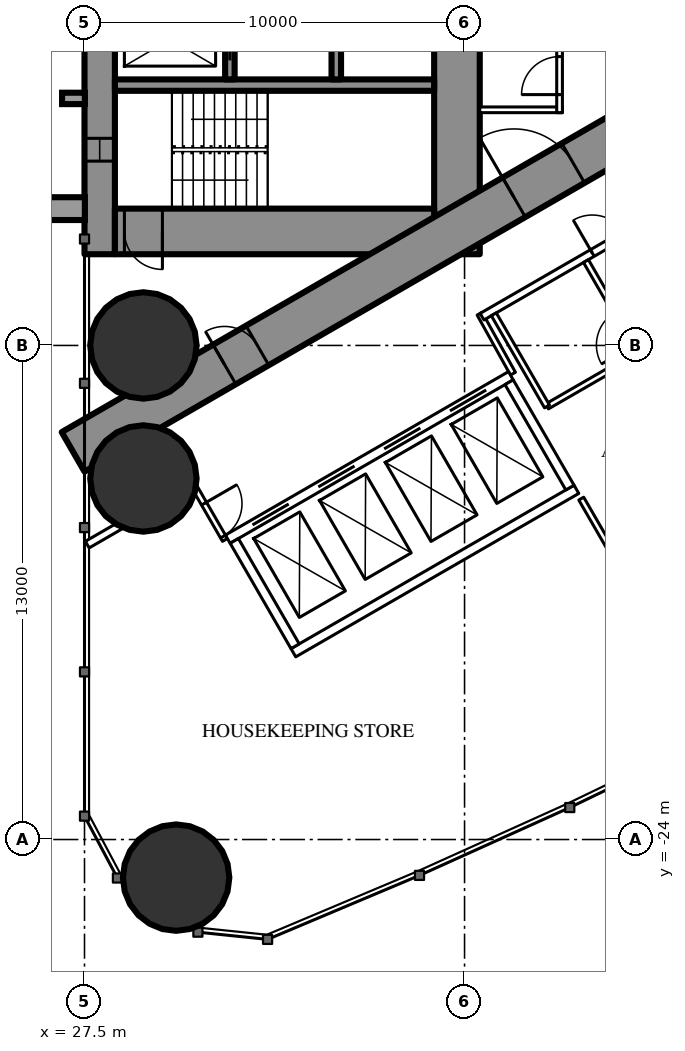
"""IFC4 building model, lengths in metres.
Left out: names, types, materials, properties, quantities, classifications, styles, units other than length and angle.
Written with IfcOpenShell. Run it as: python <this file> out.ifc"""

import sys

from ifc_helpers import new_model, si_unit, direction, frame, frame_2d, origin, origin_2d, place, context, subcontext, project, spatial, rectangle, hollow_circle, extrude, element, fill, save


model = new_model("IFC4")
c1 = context("Model", 3, precision=1e-05, world=origin(), true_north=direction((0.0, 1.0)))
c2 = subcontext(c1, "Body", "Model", "MODEL_VIEW")
j1 = project(units=[si_unit("LENGTHUNIT", "METRE"), si_unit("PLANEANGLEUNIT", "RADIAN")], contexts=[c1])
p1 = place(None, origin())
s1 = spatial("IfcSite", under=j1, at=p1, CompositionType="ELEMENT")
p2 = place(p1, origin())
s2 = spatial("IfcBuilding", under=s1, at=p2, CompositionType="ELEMENT")
p3 = place(p2, frame((0.0, 0.0, 18.0)))
s3 = spatial("IfcBuildingStorey", under=s2, at=p3, CompositionType="ELEMENT", Elevation=18.0)
for number, where, z_axis, x_axis in (
    (1, (29.911, -25.002, 0.0), (0.0, 0.0, 1.0), (1.0, 0.0, 0.0)),
    (2, (29.05, -11.0, 0.0), (0.0, 0.0, 1.0), (1.0, 0.0, 0.0)),
    (3, (29.05, -14.5, 0.0), (0.0, 0.0, 1.0), (1.0, 0.0, 0.0)),
):
    element("IfcColumn", number, at=place(p3, frame(where, z_axis=z_axis, x_axis=x_axis)), inside=s3, PredefinedType="COLUMN", context=c2, shape_type="SweptSolid", body=[
        extrude(hollow_circle(Radius=1.4, WallThickness=0.12, at=origin_2d()), origin(), (0.0, 0.0, 1.0), 3.5),
    ])
p4 = place(p3, frame((27.9, -8.6, 0.0), z_axis=(0.0, 0.0, 1.0), x_axis=(0.0, 1.0, 0.0)))
e4 = element("IfcWall", 4, at=p4, inside=s3, PredefinedType="SHEAR", context=c2, shape_type="SweptSolid", body=[
    extrude(rectangle(XDim=17.2, YDim=0.8, at=frame_2d((8.6, 0.0))), origin(), (0.0, 0.0, 1.0), 3.5),
])
p5 = place(p4, frame((2.45, 0.0, 0.6)))
e5 = element("IfcOpeningElement", 5, at=p5, cuts=e4, PredefinedType="OPENING", context=c2, shape_type="SweptSolid", body=[
    extrude(rectangle(XDim=0.6, YDim=2.1, at=frame_2d((0.3, 1.05))), frame((0.0, 0.41, 0.0), z_axis=(0.0, -1.0, 0.0), x_axis=(1.0, 0.0, 0.0)), (0.0, 0.0, 1.0), 0.82),
])
p6 = place(p4, frame((14.15, 0.0, 0.6)))
e6 = element("IfcOpeningElement", 6, at=p6, cuts=e4, PredefinedType="OPENING", context=c2, shape_type="SweptSolid", body=[
    extrude(rectangle(XDim=0.6, YDim=2.1, at=frame_2d((0.3, 1.05))), frame((0.0, 0.41, 0.0), z_axis=(0.0, -1.0, 0.0), x_axis=(1.0, 0.0, 0.0)), (0.0, 0.0, 1.0), 0.82),
])
p7 = place(p3, frame((37.3, -8.6, 0.0), z_axis=(0.0, 0.0, 1.0), x_axis=(0.0, 1.0, 0.0)))
e7 = element("IfcWall", 7, at=p7, inside=s3, PredefinedType="SHEAR", context=c2, shape_type="SweptSolid", body=[
    extrude(rectangle(XDim=17.2, YDim=1.2, at=frame_2d((8.6, 0.0))), origin(), (0.0, 0.0, 1.0), 3.5),
])
p8 = place(p7, frame((7.7, 0.0, 0.0)))
e8 = element("IfcOpeningElement", 8, at=p8, cuts=e7, PredefinedType="OPENING", context=c2, shape_type="SweptSolid", body=[
    extrude(rectangle(XDim=1.8, YDim=2.2, at=frame_2d((0.9, 1.1))), frame((0.0, 0.61, 0.0), z_axis=(0.0, -1.0, 0.0), x_axis=(1.0, 0.0, 0.0)), (0.0, 0.0, 1.0), 1.22),
])
p9 = place(p3, frame((28.3, -8.0, 0.0), z_axis=(0.0, 0.0, 1.0), x_axis=(1.0, 0.0, 0.0)))
e9 = element("IfcWall", 9, at=p9, inside=s3, PredefinedType="SHEAR", context=c2, shape_type="SweptSolid", body=[
    extrude(rectangle(XDim=8.4, YDim=1.2, at=frame_2d((4.2, 0.0))), origin(), (0.0, 0.0, 1.0), 3.5),
])
p10 = place(p9, frame((0.25, 0.0, 0.0)))
e10 = element("IfcOpeningElement", 10, at=p10, cuts=e9, PredefinedType="OPENING", context=c2, shape_type="SweptSolid", body=[
    extrude(rectangle(XDim=1.0, YDim=2.2, at=frame_2d((0.5, 1.1))), frame((0.0, 0.61, 0.0), z_axis=(0.0, -1.0, 0.0), x_axis=(1.0, 0.0, 0.0)), (0.0, 0.0, 1.0), 1.22),
])
p11 = place(p3, frame((28.3, -4.15, 0.0), z_axis=(0.0, 0.0, 1.0), x_axis=(1.0, 0.0, 0.0)))
e11 = element("IfcWall", 11, at=p11, inside=s3, PredefinedType="SHEAR", context=c2, shape_type="SweptSolid", body=[
    extrude(rectangle(XDim=8.4, YDim=0.3, at=frame_2d((4.2, 0.0))), origin(), (0.0, 0.0, 1.0), 3.5),
])
p12 = place(p3, frame((31.325, -4.0, 0.0), z_axis=(0.0, 0.0, 1.0), x_axis=(0.0, 1.0, 0.0)))
e12 = element("IfcWall", 12, at=p12, inside=s3, PredefinedType="SHEAR", context=c2, shape_type="SweptSolid", body=[
    extrude(rectangle(XDim=2.1, YDim=0.25, at=frame_2d((1.05, 0.0))), origin(), (0.0, 0.0, 1.0), 3.5),
])
p13 = place(p12, frame((0.5, 0.0, 0.0)))
e13 = element("IfcOpeningElement", 13, at=p13, cuts=e12, PredefinedType="OPENING", context=c2, shape_type="SweptSolid", body=[
    extrude(rectangle(XDim=1.1, YDim=2.2, at=frame_2d((0.55, 1.1))), frame((0.0, 0.135, 0.0), z_axis=(0.0, -1.0, 0.0), x_axis=(1.0, 0.0, 0.0)), (0.0, 0.0, 1.0), 0.27),
])
p14 = place(p3, frame((34.125, -4.0, 0.0), z_axis=(0.0, 0.0, 1.0), x_axis=(0.0, 1.0, 0.0)))
e14 = element("IfcWall", 14, at=p14, inside=s3, PredefinedType="SHEAR", context=c2, shape_type="SweptSolid", body=[
    extrude(rectangle(XDim=2.35, YDim=0.25, at=frame_2d((1.175, 0.0))), origin(), (0.0, 0.0, 1.0), 3.5),
])
p15 = place(p14, frame((0.875, 0.0, 0.0)))
e15 = element("IfcOpeningElement", 15, at=p15, cuts=e14, PredefinedType="OPENING", context=c2, shape_type="SweptSolid", body=[
    extrude(rectangle(XDim=0.6, YDim=2.0, at=frame_2d((0.3, 1.0))), frame((0.0, 0.135, 0.0), z_axis=(0.0, -1.0, 0.0), x_axis=(1.0, 0.0, 0.0)), (0.0, 0.0, 1.0), 0.27),
])
p16 = place(p3, frame((27.2, -13.8, 0.0), z_axis=(0.0, 0.0, 1.0), x_axis=(0.866027159892, 0.499996958321, 0.0)))
e16 = element("IfcWall", 16, at=p16, inside=s3, PredefinedType="SHEAR", context=c2, shape_type="SweptSolid", body=[
    extrude(rectangle(XDim=27.947, YDim=1.2, at=frame_2d((13.973, 0.0))), origin(), (0.0, 0.0, 1.0), 3.5),
])
p17 = place(p16, frame((4.6, 0.0, 0.0)))
e17 = element("IfcOpeningElement", 17, at=p17, cuts=e16, PredefinedType="OPENING", context=c2, shape_type="SweptSolid", body=[
    extrude(rectangle(XDim=1.0, YDim=2.2, at=frame_2d((0.5, 1.1))), frame((0.0, 0.61, 0.0), z_axis=(0.0, -1.0, 0.0), x_axis=(1.0, 0.0, 0.0)), (0.0, 0.0, 1.0), 1.22),
])
p18 = place(p16, frame((13.395, 0.0, 0.0)))
e18 = element("IfcOpeningElement", 18, at=p18, cuts=e16, PredefinedType="OPENING", context=c2, shape_type="SweptSolid", body=[
    extrude(rectangle(XDim=1.8, YDim=2.2, at=frame_2d((0.9, 1.1))), frame((0.0, 0.61, 0.0), z_axis=(0.0, -1.0, 0.0), x_axis=(1.0, 0.0, 0.0)), (0.0, 0.0, 1.0), 1.22),
])
p19 = place(p3, frame((40.57, -15.03, 0.0), z_axis=(0.0, 0.0, 1.0), x_axis=(0.500012993597, -0.866017901798, 0.0)))
e19 = element("IfcWall", 19, at=p19, inside=s3, PredefinedType="PARTITIONING", context=c2, shape_type="SweptSolid", body=[
    extrude(rectangle(XDim=4.243, YDim=0.15, at=frame_2d((2.122, 0.0))), origin(), (0.0, 0.0, 1.0), 3.25),
])
p20 = place(p3, frame((27.572, -16.241, 0.0), z_axis=(0.0, 0.0, 1.0), x_axis=(0.866029654818, 0.499992636921, 0.0)))
e20 = element("IfcWall", 20, at=p20, inside=s3, PredefinedType="PARTITIONING", context=c2, shape_type="SweptSolid", body=[
    extrude(rectangle(XDim=3.155, YDim=0.2, at=frame_2d((1.577, 0.0))), origin(), (0.0, 0.0, 1.0), 3.25),
])
p21 = place(p3, frame((38.773, -11.742, 0.0), z_axis=(0.0, 0.0, 1.0), x_axis=(-0.485528096672, 0.8742210632, 0.0)))
e21 = element("IfcWall", 21, at=p21, inside=s3, PredefinedType="PARTITIONING", context=c2, shape_type="SweptSolid", body=[
    extrude(rectangle(XDim=1.805, YDim=0.15, at=frame_2d((0.903, 0.0))), origin(), (0.0, 0.0, 1.0), 3.25),
])
p22 = place(p3, frame((30.293, -14.554, 0.0), z_axis=(0.0, 0.0, 1.0), x_axis=(0.499980071345, -0.866036909293, 0.0)))
e22 = element("IfcWall", 22, at=p22, inside=s3, PredefinedType="PARTITIONING", context=c2, shape_type="SweptSolid", body=[
    extrude(rectangle(XDim=1.805, YDim=0.15, at=frame_2d((0.902, 0.0))), origin(), (0.0, 0.0, 1.0), 3.25),
])
p23 = place(p22, frame((0.702, 0.0, 0.0)))
e23 = element("IfcOpeningElement", 23, at=p23, cuts=e22, PredefinedType="OPENING", context=c2, shape_type="SweptSolid", body=[
    extrude(rectangle(XDim=1.0, YDim=2.2, at=frame_2d((0.5, 1.1))), frame((0.0, 0.085, 0.0), z_axis=(0.0, -1.0, 0.0), x_axis=(1.0, 0.0, 0.0)), (0.0, 0.0, 1.0), 0.17),
])
p24 = place(p3, frame((37.96, -10.243, 0.0), z_axis=(0.0, 0.0, 1.0), x_axis=(0.866024617314, 0.500001362204, 0.0)))
e24 = element("IfcWall", 24, at=p24, inside=s3, PredefinedType="PARTITIONING", context=c2, shape_type="SweptSolid", body=[
    extrude(rectangle(XDim=8.512, YDim=0.2, at=frame_2d((4.256, 0.0))), origin(), (0.0, 0.0, 1.0), 3.25),
])
p25 = place(p24, frame((3.35, 0.0, 0.0)))
e25 = element("IfcOpeningElement", 25, at=p25, cuts=e24, PredefinedType="OPENING", context=c2, shape_type="SweptSolid", body=[
    extrude(rectangle(XDim=1.0, YDim=2.2, at=frame_2d((0.5, 1.1))), frame((0.0, 0.11, 0.0), z_axis=(0.0, -1.0, 0.0), x_axis=(1.0, 0.0, 0.0)), (0.0, 0.0, 1.0), 0.22),
])
p26 = place(p3, frame((39.67, -12.605, 0.0), z_axis=(0.0, 0.0, 1.0), x_axis=(0.866018712932, 0.500011588718, 0.0)))
e26 = element("IfcWall", 26, at=p26, inside=s3, PredefinedType="PARTITIONING", context=c2, shape_type="SweptSolid", body=[
    extrude(rectangle(XDim=2.875, YDim=0.15, at=frame_2d((1.438, 0.0))), origin(), (0.0, 0.0, 1.0), 3.25),
])
p27 = place(p3, frame((40.695, -8.78, 0.0), z_axis=(0.0, 0.0, 1.0), x_axis=(0.500049511043, -0.865996816683, 0.0)))
e27 = element("IfcWall", 27, at=p27, inside=s3, PredefinedType="PARTITIONING", context=c2, shape_type="SweptSolid", body=[
    extrude(rectangle(XDim=2.8, YDim=0.15, at=frame_2d((1.4, 0.0))), origin(), (0.0, 0.0, 1.0), 3.25),
])
p28 = place(p27, frame((1.55, 0.0, 0.0)))
e28 = element("IfcOpeningElement", 28, at=p28, cuts=e27, PredefinedType="OPENING", context=c2, shape_type="SweptSolid", body=[
    extrude(rectangle(XDim=1.0, YDim=2.2, at=frame_2d((0.5, 1.1))), frame((0.0, 0.085, 0.0), z_axis=(0.0, -1.0, 0.0), x_axis=(1.0, 0.0, 0.0)), (0.0, 0.0, 1.0), 0.17),
])
p29 = place(p3, frame((38.27, -10.18, 0.0), z_axis=(0.0, 0.0, 1.0), x_axis=(0.500049511043, -0.865996816683, 0.0)))
e29 = element("IfcWall", 29, at=p29, inside=s3, PredefinedType="PARTITIONING", context=c2, shape_type="SweptSolid", body=[
    extrude(rectangle(XDim=2.8, YDim=0.15, at=frame_2d((1.4, 0.0))), origin(), (0.0, 0.0, 1.0), 3.25),
])
p30 = place(p3, frame((37.9, -4.8, 0.0), z_axis=(0.0, 0.0, 1.0), x_axis=(1.0, 0.0, 0.0)))
e30 = element("IfcWall", 30, at=p30, inside=s3, PredefinedType="PARTITIONING", context=c2, shape_type="SweptSolid", body=[
    extrude(rectangle(XDim=2.175, YDim=0.15, at=frame_2d((1.087, 0.0))), origin(), (0.0, 0.0, 1.0), 3.25),
])
p31 = place(p3, frame((40.0, -4.875, 0.0), z_axis=(0.0, 0.0, 1.0), x_axis=(0.0, 1.0, 0.0)))
e31 = element("IfcWall", 31, at=p31, inside=s3, PredefinedType="PARTITIONING", context=c2, shape_type="SweptSolid", body=[
    extrude(rectangle(XDim=1.95, YDim=0.15, at=frame_2d((0.975, 0.0))), origin(), (0.0, 0.0, 1.0), 3.25),
])
p32 = place(p31, frame((0.475, 0.0, 0.0)))
e32 = element("IfcOpeningElement", 32, at=p32, cuts=e31, PredefinedType="OPENING", context=c2, shape_type="SweptSolid", body=[
    extrude(rectangle(XDim=1.0, YDim=2.2, at=frame_2d((0.5, 1.1))), frame((0.0, 0.085, 0.0), z_axis=(0.0, -1.0, 0.0), x_axis=(1.0, 0.0, 0.0)), (0.0, 0.0, 1.0), 0.17),
])
p33 = place(p3, frame((31.271, -16.097, 0.0), z_axis=(0.0, 0.0, 1.0), x_axis=(0.86604045752, 0.499973925258, 0.0)))
e33 = element("IfcWall", 33, at=p33, inside=s3, PredefinedType="PARTITIONING", context=c2, shape_type="SweptSolid", body=[
    extrude(rectangle(XDim=8.6, YDim=0.25, at=frame_2d((4.3, 0.0))), origin(), (0.0, 0.0, 1.0), 3.25),
])
p34 = place(p33, frame((0.75, 0.0, 0.0)))
e34 = element("IfcOpeningElement", 34, at=p34, cuts=e33, PredefinedType="OPENING", context=c2, shape_type="SweptSolid", body=[
    extrude(rectangle(XDim=1.1, YDim=2.2, at=frame_2d((0.55, 1.1))), frame((0.0, 0.135, 0.0), z_axis=(0.0, -1.0, 0.0), x_axis=(1.0, 0.0, 0.0)), (0.0, 0.0, 1.0), 0.27),
])
p35 = place(p33, frame((2.75, 0.0, 0.0)))
e35 = element("IfcOpeningElement", 35, at=p35, cuts=e33, PredefinedType="OPENING", context=c2, shape_type="SweptSolid", body=[
    extrude(rectangle(XDim=1.1, YDim=2.2, at=frame_2d((0.55, 1.1))), frame((0.0, 0.135, 0.0), z_axis=(0.0, -1.0, 0.0), x_axis=(1.0, 0.0, 0.0)), (0.0, 0.0, 1.0), 0.27),
])
p36 = place(p33, frame((4.75, 0.0, 0.0)))
e36 = element("IfcOpeningElement", 36, at=p36, cuts=e33, PredefinedType="OPENING", context=c2, shape_type="SweptSolid", body=[
    extrude(rectangle(XDim=1.1, YDim=2.2, at=frame_2d((0.55, 1.1))), frame((0.0, 0.135, 0.0), z_axis=(0.0, -1.0, 0.0), x_axis=(1.0, 0.0, 0.0)), (0.0, 0.0, 1.0), 0.27),
])
p37 = place(p33, frame((6.75, 0.0, 0.0)))
e37 = element("IfcOpeningElement", 37, at=p37, cuts=e33, PredefinedType="OPENING", context=c2, shape_type="SweptSolid", body=[
    extrude(rectangle(XDim=1.1, YDim=2.2, at=frame_2d((0.55, 1.1))), frame((0.0, 0.135, 0.0), z_axis=(0.0, -1.0, 0.0), x_axis=(1.0, 0.0, 0.0)), (0.0, 0.0, 1.0), 0.27),
])
p38 = place(p3, frame((32.996, -19.086, 0.0), z_axis=(0.0, 0.0, 1.0), x_axis=(0.866028165386, 0.499995216735, 0.0)))
e38 = element("IfcWall", 38, at=p38, inside=s3, PredefinedType="PARTITIONING", context=c2, shape_type="SweptSolid", body=[
    extrude(rectangle(XDim=8.6, YDim=0.25, at=frame_2d((4.3, 0.0))), origin(), (0.0, 0.0, 1.0), 3.25),
])
for number, where, z_axis, x_axis in (
    (39, (31.441, -16.143, 0.0), (0.0, 0.0, 1.0), (0.5, -0.866, 0.0)),
    (40, (38.673, -11.968, 0.0), (0.0, 0.0, 1.0), (0.5, -0.866, 0.0)),
):
    element("IfcWall", number, at=place(p3, frame(where, z_axis=z_axis, x_axis=x_axis)), inside=s3, PredefinedType="PARTITIONING", context=c2, shape_type="SweptSolid", body=[
        extrude(rectangle(XDim=3.201, YDim=0.25, at=frame_2d((1.6, 0.0))), origin(), (0.0, 0.0, 1.0), 3.25),
    ])
p39 = place(p25, origin())
e41 = element("IfcDoor", 41, at=p39, inside=s3, OperationType="SINGLE_SWING_LEFT", PredefinedType="DOOR", context=c2, shape_type="SweptSolid", body=[
    extrude(rectangle(XDim=1.0, YDim=2.2, at=frame_2d((0.5, 1.1))), frame((0.0, 0.025, 0.0), z_axis=(0.0, -1.0, 0.0), x_axis=(1.0, 0.0, 0.0)), (0.0, 0.0, 1.0), 0.05),
])
fill(e25, e41)
p40 = place(p23, origin())
e42 = element("IfcDoor", 42, at=p40, inside=s3, OperationType="SINGLE_SWING_LEFT", PredefinedType="DOOR", context=c2, shape_type="SweptSolid", body=[
    extrude(rectangle(XDim=1.0, YDim=2.2, at=frame_2d((0.5, 1.1))), frame((0.0, 0.025, 0.0), z_axis=(0.0, -1.0, 0.0), x_axis=(1.0, 0.0, 0.0)), (0.0, 0.0, 1.0), 0.05),
])
fill(e23, e42)
p41 = place(p32, origin())
e43 = element("IfcDoor", 43, at=p41, inside=s3, OperationType="SINGLE_SWING_LEFT", PredefinedType="DOOR", context=c2, shape_type="SweptSolid", body=[
    extrude(rectangle(XDim=1.0, YDim=2.2, at=frame_2d((0.5, 1.1))), frame((0.0, 0.025, 0.0), z_axis=(0.0, -1.0, 0.0), x_axis=(1.0, 0.0, 0.0)), (0.0, 0.0, 1.0), 0.05),
])
fill(e32, e43)
p42 = place(p17, origin())
e44 = element("IfcDoor", 44, at=p42, inside=s3, OperationType="SINGLE_SWING_LEFT", PredefinedType="DOOR", context=c2, shape_type="SweptSolid", body=[
    extrude(rectangle(XDim=1.0, YDim=2.2, at=frame_2d((0.5, 1.1))), frame((0.0, 0.025, 0.0), z_axis=(0.0, -1.0, 0.0), x_axis=(1.0, 0.0, 0.0)), (0.0, 0.0, 1.0), 0.05),
])
fill(e17, e44)
p43 = place(p18, origin())
e45 = element("IfcDoor", 45, at=p43, inside=s3, OperationType="DOUBLE_DOOR_SINGLE_SWING", PredefinedType="DOOR", context=c2, shape_type="SweptSolid", body=[
    extrude(rectangle(XDim=1.8, YDim=2.2, at=frame_2d((0.9, 1.1))), frame((0.0, 0.025, 0.0), z_axis=(0.0, -1.0, 0.0), x_axis=(1.0, 0.0, 0.0)), (0.0, 0.0, 1.0), 0.05),
])
fill(e18, e45)
p44 = place(p10, origin())
e46 = element("IfcDoor", 46, at=p44, inside=s3, OperationType="SINGLE_SWING_RIGHT", PredefinedType="DOOR", context=c2, shape_type="SweptSolid", body=[
    extrude(rectangle(XDim=1.0, YDim=2.2, at=frame_2d((0.5, 1.1))), frame((0.0, 0.025, 0.0), z_axis=(0.0, -1.0, 0.0), x_axis=(1.0, 0.0, 0.0)), (0.0, 0.0, 1.0), 0.05),
])
fill(e10, e46)
p45 = place(p13, origin())
e47 = element("IfcDoor", 47, at=p45, inside=s3, OperationType="SLIDING_TO_LEFT", PredefinedType="USERDEFINED", context=c2, shape_type="SweptSolid", body=[
    extrude(rectangle(XDim=1.1, YDim=2.2, at=frame_2d((0.55, 1.1))), frame((0.0, 0.025, 0.0), z_axis=(0.0, -1.0, 0.0), x_axis=(1.0, 0.0, 0.0)), (0.0, 0.0, 1.0), 0.05),
])
fill(e13, e47)
p46 = place(p34, origin())
e48 = element("IfcDoor", 48, at=p46, inside=s3, OperationType="DOUBLE_DOOR_SLIDING", PredefinedType="USERDEFINED", context=c2, shape_type="SweptSolid", body=[
    extrude(rectangle(XDim=1.1, YDim=2.2, at=frame_2d((0.55, 1.1))), frame((0.0, 0.025, 0.0), z_axis=(0.0, -1.0, 0.0), x_axis=(1.0, 0.0, 0.0)), (0.0, 0.0, 1.0), 0.05),
])
fill(e34, e48)
p47 = place(p35, origin())
e49 = element("IfcDoor", 49, at=p47, inside=s3, OperationType="DOUBLE_DOOR_SLIDING", PredefinedType="USERDEFINED", context=c2, shape_type="SweptSolid", body=[
    extrude(rectangle(XDim=1.1, YDim=2.2, at=frame_2d((0.55, 1.1))), frame((0.0, 0.025, 0.0), z_axis=(0.0, -1.0, 0.0), x_axis=(1.0, 0.0, 0.0)), (0.0, 0.0, 1.0), 0.05),
])
fill(e35, e49)
p48 = place(p36, origin())
e50 = element("IfcDoor", 50, at=p48, inside=s3, OperationType="DOUBLE_DOOR_SLIDING", PredefinedType="USERDEFINED", context=c2, shape_type="SweptSolid", body=[
    extrude(rectangle(XDim=1.1, YDim=2.2, at=frame_2d((0.55, 1.1))), frame((0.0, 0.025, 0.0), z_axis=(0.0, -1.0, 0.0), x_axis=(1.0, 0.0, 0.0)), (0.0, 0.0, 1.0), 0.05),
])
fill(e36, e50)
p49 = place(p37, origin())
e51 = element("IfcDoor", 51, at=p49, inside=s3, OperationType="DOUBLE_DOOR_SLIDING", PredefinedType="USERDEFINED", context=c2, shape_type="SweptSolid", body=[
    extrude(rectangle(XDim=1.1, YDim=2.2, at=frame_2d((0.55, 1.1))), frame((0.0, 0.025, 0.0), z_axis=(0.0, -1.0, 0.0), x_axis=(1.0, 0.0, 0.0)), (0.0, 0.0, 1.0), 0.05),
])
fill(e37, e51)
p50 = place(p5, origin())
e52 = element("IfcWindow", 52, at=p50, inside=s3, PartitioningType="SINGLE_PANEL", PredefinedType="WINDOW", context=c2, shape_type="SweptSolid", body=[
    extrude(rectangle(XDim=0.6, YDim=2.1, at=frame_2d((0.3, 1.05))), frame((0.0, 0.03, 0.0), z_axis=(0.0, -1.0, 0.0), x_axis=(1.0, 0.0, 0.0)), (0.0, 0.0, 1.0), 0.06),
])
fill(e5, e52)
save(model, sys.argv[1])
